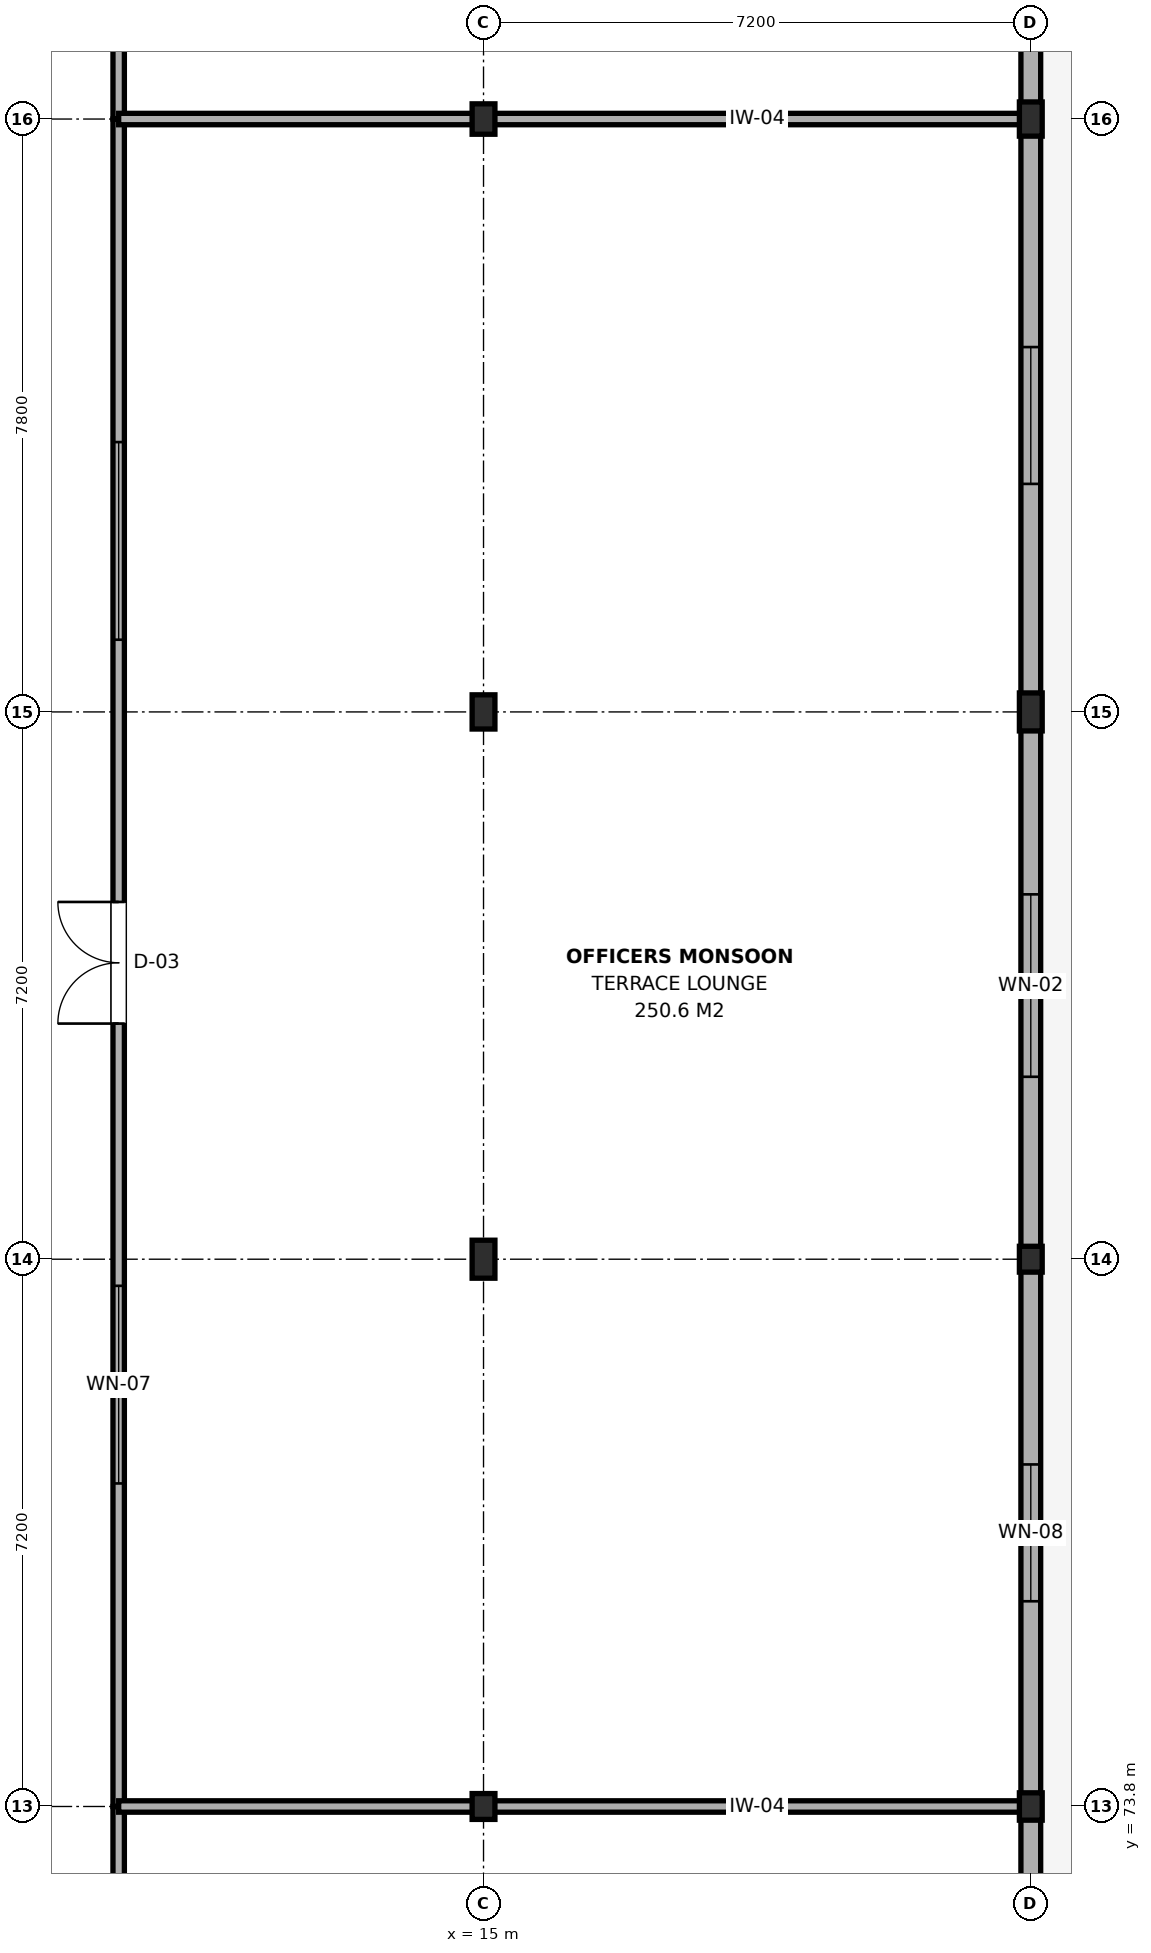
"""IFC4 building model, lengths in metres.
Left out: names, types, materials, properties, quantities, classifications, styles, units other than length and angle.
Written with IfcOpenShell. Run it as: python <this file> out.ifc"""

import sys

from ifc_helpers import new_model, si_unit, direction, frame, frame_2d, origin, origin_2d, place, context, subcontext, project, spatial, rectangle, i_section, extrude, element, fill, save


model = new_model("IFC4")
c1 = context("Model", 3, precision=1e-05, world=origin(), true_north=direction((0.0, 1.0)))
c2 = subcontext(c1, "Body", "Model", "MODEL_VIEW")
j1 = project(units=[si_unit("LENGTHUNIT", "METRE"), si_unit("PLANEANGLEUNIT", "RADIAN")], contexts=[c1])
p1 = place(None, origin())
s1 = spatial("IfcSite", under=j1, at=p1, CompositionType="ELEMENT")
p2 = place(p1, origin())
s2 = spatial("IfcBuilding", under=s1, at=p2, CompositionType="ELEMENT")
p3 = place(p2, frame((0.0, 0.0, 17.1)))
s3 = spatial("IfcBuildingStorey", under=s2, at=p3, CompositionType="ELEMENT", Elevation=17.1)
p4 = place(p3, frame((15.0, 73.8, 0.0), z_axis=(0.0, 0.0, 1.0), x_axis=(1.0, 0.0, 0.0)))
e1 = element("IfcColumn", 1, at=p4, inside=s3, PredefinedType="COLUMN", context=c2, shape_type="SweptSolid", body=[
    extrude(i_section(OverallWidth=0.3, OverallDepth=0.34, WebThickness=0.012, FlangeThickness=0.021, FilletRadius=0.027, at=origin_2d()), origin(), (0.0, 0.0, 1.0), 3.9),
])
p5 = place(p3, frame((15.0, 81.0, 0.0), z_axis=(0.0, 0.0, 1.0), x_axis=(1.0, 0.0, 0.0)))
e2 = element("IfcColumn", 2, at=p5, inside=s3, PredefinedType="COLUMN", context=c2, shape_type="SweptSolid", body=[
    extrude(i_section(OverallWidth=0.3, OverallDepth=0.5, WebThickness=0.014, FlangeThickness=0.028, FilletRadius=0.027, at=origin_2d()), origin(), (0.0, 0.0, 1.0), 3.9),
])
p6 = place(p3, frame((15.0, 88.2, 0.0), z_axis=(0.0, 0.0, 1.0), x_axis=(1.0, 0.0, 0.0)))
e3 = element("IfcColumn", 3, at=p6, inside=s3, PredefinedType="COLUMN", context=c2, shape_type="SweptSolid", body=[
    extrude(i_section(OverallWidth=0.3, OverallDepth=0.45, WebThickness=0.014, FlangeThickness=0.026, FilletRadius=0.027, at=origin_2d()), origin(), (0.0, 0.0, 1.0), 3.9),
])
p7 = place(p3, frame((15.0, 96.0, 0.0), z_axis=(0.0, 0.0, 1.0), x_axis=(1.0, 0.0, 0.0)))
e4 = element("IfcColumn", 4, at=p7, inside=s3, PredefinedType="COLUMN", context=c2, shape_type="SweptSolid", body=[
    extrude(i_section(OverallWidth=0.3, OverallDepth=0.4, WebThickness=0.013, FlangeThickness=0.024, FilletRadius=0.027, at=origin_2d()), origin(), (0.0, 0.0, 1.0), 3.9),
])
p8 = place(p3, frame((22.2, 73.8, 0.0), z_axis=(0.0, 0.0, 1.0), x_axis=(1.0, 0.0, 0.0)))
e5 = element("IfcColumn", 5, at=p8, inside=s3, PredefinedType="COLUMN", context=c2, shape_type="SweptSolid", body=[
    extrude(i_section(OverallWidth=0.3, OverallDepth=0.36, WebThickness=0.012, FlangeThickness=0.022, FilletRadius=0.027, at=origin_2d()), origin(), (0.0, 0.0, 1.0), 3.9),
])
p9 = place(p3, frame((22.2, 81.0, 0.0), z_axis=(0.0, 0.0, 1.0), x_axis=(1.0, 0.0, 0.0)))
e6 = element("IfcColumn", 6, at=p9, inside=s3, PredefinedType="COLUMN", context=c2, shape_type="SweptSolid", body=[
    extrude(i_section(OverallWidth=0.3, OverallDepth=0.34, WebThickness=0.012, FlangeThickness=0.021, FilletRadius=0.027, at=origin_2d()), origin(), (0.0, 0.0, 1.0), 3.9),
])
p10 = place(p3, frame((22.2, 88.2, 0.0), z_axis=(0.0, 0.0, 1.0), x_axis=(1.0, 0.0, 0.0)))
e7 = element("IfcColumn", 7, at=p10, inside=s3, PredefinedType="COLUMN", context=c2, shape_type="SweptSolid", body=[
    extrude(i_section(OverallWidth=0.3, OverallDepth=0.5, WebThickness=0.014, FlangeThickness=0.028, FilletRadius=0.027, at=origin_2d()), origin(), (0.0, 0.0, 1.0), 3.9),
])
p11 = place(p3, frame((22.2, 96.0, 0.0), z_axis=(0.0, 0.0, 1.0), x_axis=(1.0, 0.0, 0.0)))
e8 = element("IfcColumn", 8, at=p11, inside=s3, PredefinedType="COLUMN", context=c2, shape_type="SweptSolid", body=[
    extrude(i_section(OverallWidth=0.3, OverallDepth=0.45, WebThickness=0.014, FlangeThickness=0.026, FilletRadius=0.027, at=origin_2d()), origin(), (0.0, 0.0, 1.0), 3.9),
])
p12 = place(p3, frame((22.2, 66.6, 0.0), z_axis=(0.0, 0.0, 1.0), x_axis=(0.0, 1.0, 0.0)))
e9 = element("IfcWall", 9, at=p12, inside=s3, PredefinedType="SOLIDWALL", context=c2, shape_type="SweptSolid", body=[
    extrude(rectangle(XDim=7.2, YDim=0.26, at=frame_2d((3.6, 0.0))), origin(), (0.0, 0.0, 1.0), 3.095),
])
p13 = place(p12, frame((2.7, 0.0, 0.65)))
e10 = element("IfcOpeningElement", 10, at=p13, cuts=e9, PredefinedType="OPENING", context=c2, shape_type="SweptSolid", body=[
    extrude(rectangle(XDim=1.8, YDim=1.2, at=frame_2d((0.9, 0.6))), frame((0.0, 0.145, 0.0), z_axis=(0.0, -1.0, 0.0), x_axis=(1.0, 0.0, 0.0)), (0.0, 0.0, 1.0), 0.29),
])
p14 = place(p3, frame((22.2, 73.8, 0.0), z_axis=(0.0, 0.0, 1.0), x_axis=(0.0, 1.0, 0.0)))
e11 = element("IfcWall", 11, at=p14, inside=s3, PredefinedType="SOLIDWALL", context=c2, shape_type="SweptSolid", body=[
    extrude(rectangle(XDim=7.2, YDim=0.26, at=frame_2d((3.6, 0.0))), origin(), (0.0, 0.0, 1.0), 3.145),
])
p15 = place(p14, frame((2.7, 0.0, 0.65)))
e12 = element("IfcOpeningElement", 12, at=p15, cuts=e11, PredefinedType="OPENING", context=c2, shape_type="SweptSolid", body=[
    extrude(rectangle(XDim=1.8, YDim=1.2, at=frame_2d((0.9, 0.6))), frame((0.0, 0.145, 0.0), z_axis=(0.0, -1.0, 0.0), x_axis=(1.0, 0.0, 0.0)), (0.0, 0.0, 1.0), 0.29),
])
p16 = place(p3, frame((22.2, 81.0, 0.0), z_axis=(0.0, 0.0, 1.0), x_axis=(0.0, 1.0, 0.0)))
e13 = element("IfcWall", 13, at=p16, inside=s3, PredefinedType="SOLIDWALL", context=c2, shape_type="SweptSolid", body=[
    extrude(rectangle(XDim=7.2, YDim=0.26, at=frame_2d((3.6, 0.0))), origin(), (0.0, 0.0, 1.0), 3.195),
])
p17 = place(p16, frame((2.4, 0.0, 0.9)))
e14 = element("IfcOpeningElement", 14, at=p17, cuts=e13, PredefinedType="OPENING", context=c2, shape_type="SweptSolid", body=[
    extrude(rectangle(XDim=2.4, YDim=2.1, at=frame_2d((1.2, 1.05))), frame((0.0, 0.145, 0.0), z_axis=(0.0, -1.0, 0.0), x_axis=(1.0, 0.0, 0.0)), (0.0, 0.0, 1.0), 0.29),
])
p18 = place(p3, frame((22.2, 88.2, 0.0), z_axis=(0.0, 0.0, 1.0), x_axis=(0.0, 1.0, 0.0)))
e15 = element("IfcWall", 15, at=p18, inside=s3, PredefinedType="SOLIDWALL", context=c2, shape_type="SweptSolid", body=[
    extrude(rectangle(XDim=7.8, YDim=0.26, at=frame_2d((3.9, 0.0))), origin(), (0.0, 0.0, 1.0), 3.155),
])
p19 = place(p18, frame((3.0, 0.0, 0.65)))
e16 = element("IfcOpeningElement", 16, at=p19, cuts=e15, PredefinedType="OPENING", context=c2, shape_type="SweptSolid", body=[
    extrude(rectangle(XDim=1.8, YDim=1.2, at=frame_2d((0.9, 0.6))), frame((0.0, 0.145, 0.0), z_axis=(0.0, -1.0, 0.0), x_axis=(1.0, 0.0, 0.0)), (0.0, 0.0, 1.0), 0.29),
])
p20 = place(p3, frame((22.2, 96.0, 0.0), z_axis=(0.0, 0.0, 1.0), x_axis=(0.0, 1.0, 0.0)))
e17 = element("IfcWall", 17, at=p20, inside=s3, PredefinedType="SOLIDWALL", context=c2, shape_type="SweptSolid", body=[
    extrude(rectangle(XDim=8.4, YDim=0.26, at=frame_2d((4.2, 0.0))), origin(), (0.0, 0.0, 1.0), 3.155),
])
p21 = place(p20, frame((1.352, 0.0, 0.65)))
e18 = element("IfcOpeningElement", 18, at=p21, cuts=e17, PredefinedType="OPENING", context=c2, shape_type="SweptSolid", body=[
    extrude(rectangle(XDim=2.0, YDim=1.8, at=frame_2d((1.0, 0.9))), frame((0.0, 0.145, 0.0), z_axis=(0.0, -1.0, 0.0), x_axis=(1.0, 0.0, 0.0)), (0.0, 0.0, 1.0), 0.29),
])
p22 = place(p20, frame((5.048, 0.0, 0.65)))
e19 = element("IfcOpeningElement", 19, at=p22, cuts=e17, PredefinedType="OPENING", context=c2, shape_type="SweptSolid", body=[
    extrude(rectangle(XDim=2.0, YDim=1.8, at=frame_2d((1.0, 0.9))), frame((0.0, 0.145, 0.0), z_axis=(0.0, -1.0, 0.0), x_axis=(1.0, 0.0, 0.0)), (0.0, 0.0, 1.0), 0.29),
])
p23 = place(p3, frame((10.2, 42.0, 0.0), z_axis=(0.0, 0.0, 1.0), x_axis=(0.0, 1.0, 0.0)))
e20 = element("IfcWall", 20, at=p23, inside=s3, PredefinedType="PARTITIONING", context=c2, shape_type="SweptSolid", body=[
    extrude(rectangle(XDim=31.8, YDim=0.15, at=frame_2d((15.9, 0.0))), origin(), (0.0, 0.0, 1.0), 3.195),
])
p24 = place(p23, frame((15.1, 0.0, 0.0)))
e21 = element("IfcOpeningElement", 21, at=p24, cuts=e20, PredefinedType="OPENING", context=c2, shape_type="SweptSolid", body=[
    extrude(rectangle(XDim=1.6, YDim=2.15, at=frame_2d((0.8, 1.075))), frame((0.0, 0.09, 0.0), z_axis=(0.0, -1.0, 0.0), x_axis=(1.0, 0.0, 0.0)), (0.0, 0.0, 1.0), 0.18),
])
p25 = place(p23, frame((6.65, 0.0, 0.95)))
e22 = element("IfcOpeningElement", 22, at=p25, cuts=e20, PredefinedType="OPENING", context=c2, shape_type="SweptSolid", body=[
    extrude(rectangle(XDim=2.6, YDim=1.5, at=frame_2d((1.3, 0.75))), frame((0.0, 0.09, 0.0), z_axis=(0.0, -1.0, 0.0), x_axis=(1.0, 0.0, 0.0)), (0.0, 0.0, 1.0), 0.18),
])
p26 = place(p23, frame((22.55, 0.0, 0.95)))
e23 = element("IfcOpeningElement", 23, at=p26, cuts=e20, PredefinedType="OPENING", context=c2, shape_type="SweptSolid", body=[
    extrude(rectangle(XDim=2.6, YDim=1.5, at=frame_2d((1.3, 0.75))), frame((0.0, 0.09, 0.0), z_axis=(0.0, -1.0, 0.0), x_axis=(1.0, 0.0, 0.0)), (0.0, 0.0, 1.0), 0.18),
])
p27 = place(p3, frame((10.2, 73.8, 0.0), z_axis=(0.0, 0.0, 1.0), x_axis=(0.0, 1.0, 0.0)))
e24 = element("IfcWall", 24, at=p27, inside=s3, PredefinedType="PARTITIONING", context=c2, shape_type="SweptSolid", body=[
    extrude(rectangle(XDim=22.2, YDim=0.15, at=frame_2d((11.1, 0.0))), origin(), (0.0, 0.0, 1.0), 3.195),
])
p28 = place(p27, frame((10.3, 0.0, 0.0)))
e25 = element("IfcOpeningElement", 25, at=p28, cuts=e24, PredefinedType="OPENING", context=c2, shape_type="SweptSolid", body=[
    extrude(rectangle(XDim=1.6, YDim=2.15, at=frame_2d((0.8, 1.075))), frame((0.0, 0.09, 0.0), z_axis=(0.0, -1.0, 0.0), x_axis=(1.0, 0.0, 0.0)), (0.0, 0.0, 1.0), 0.18),
])
p29 = place(p27, frame((4.25, 0.0, 0.95)))
e26 = element("IfcOpeningElement", 26, at=p29, cuts=e24, PredefinedType="OPENING", context=c2, shape_type="SweptSolid", body=[
    extrude(rectangle(XDim=2.6, YDim=1.5, at=frame_2d((1.3, 0.75))), frame((0.0, 0.09, 0.0), z_axis=(0.0, -1.0, 0.0), x_axis=(1.0, 0.0, 0.0)), (0.0, 0.0, 1.0), 0.18),
])
p30 = place(p27, frame((15.35, 0.0, 0.95)))
e27 = element("IfcOpeningElement", 27, at=p30, cuts=e24, PredefinedType="OPENING", context=c2, shape_type="SweptSolid", body=[
    extrude(rectangle(XDim=2.6, YDim=1.5, at=frame_2d((1.3, 0.75))), frame((0.0, 0.09, 0.0), z_axis=(0.0, -1.0, 0.0), x_axis=(1.0, 0.0, 0.0)), (0.0, 0.0, 1.0), 0.18),
])
p31 = place(p3, frame((10.2, 73.8, 0.0), z_axis=(0.0, 0.0, 1.0), x_axis=(1.0, 0.0, 0.0)))
e28 = element("IfcWall", 28, at=p31, inside=s3, PredefinedType="PARTITIONING", context=c2, shape_type="SweptSolid", body=[
    extrude(rectangle(XDim=11.86, YDim=0.15, at=frame_2d((5.93, 0.0))), origin(), (0.0, 0.0, 1.0), 3.195),
])
p32 = place(p3, frame((10.2, 96.0, 0.0), z_axis=(0.0, 0.0, 1.0), x_axis=(0.0, 1.0, 0.0)))
e29 = element("IfcWall", 29, at=p32, inside=s3, PredefinedType="PARTITIONING", context=c2, shape_type="SweptSolid", body=[
    extrude(rectangle(XDim=17.4, YDim=0.15, at=frame_2d((8.7, 0.0))), origin(), (0.0, 0.0, 1.0), 3.195),
])
p33 = place(p32, frame((7.9, 0.0, 0.0)))
e30 = element("IfcOpeningElement", 30, at=p33, cuts=e29, PredefinedType="OPENING", context=c2, shape_type="SweptSolid", body=[
    extrude(rectangle(XDim=1.6, YDim=2.15, at=frame_2d((0.8, 1.075))), frame((0.0, 0.09, 0.0), z_axis=(0.0, -1.0, 0.0), x_axis=(1.0, 0.0, 0.0)), (0.0, 0.0, 1.0), 0.18),
])
p34 = place(p32, frame((3.05, 0.0, 0.95)))
e31 = element("IfcOpeningElement", 31, at=p34, cuts=e29, PredefinedType="OPENING", context=c2, shape_type="SweptSolid", body=[
    extrude(rectangle(XDim=2.6, YDim=1.5, at=frame_2d((1.3, 0.75))), frame((0.0, 0.09, 0.0), z_axis=(0.0, -1.0, 0.0), x_axis=(1.0, 0.0, 0.0)), (0.0, 0.0, 1.0), 0.18),
])
p35 = place(p32, frame((11.75, 0.0, 0.95)))
e32 = element("IfcOpeningElement", 32, at=p35, cuts=e29, PredefinedType="OPENING", context=c2, shape_type="SweptSolid", body=[
    extrude(rectangle(XDim=2.6, YDim=1.5, at=frame_2d((1.3, 0.75))), frame((0.0, 0.09, 0.0), z_axis=(0.0, -1.0, 0.0), x_axis=(1.0, 0.0, 0.0)), (0.0, 0.0, 1.0), 0.18),
])
p36 = place(p3, frame((10.2, 96.0, 0.0), z_axis=(0.0, 0.0, 1.0), x_axis=(1.0, 0.0, 0.0)))
e33 = element("IfcWall", 33, at=p36, inside=s3, PredefinedType="PARTITIONING", context=c2, shape_type="SweptSolid", body=[
    extrude(rectangle(XDim=11.86, YDim=0.15, at=frame_2d((5.93, 0.0))), origin(), (0.0, 0.0, 1.0), 3.095),
])
p37 = place(p15, origin())
e34 = element("IfcWindow", 34, at=p37, inside=s3, PartitioningType="SINGLE_PANEL", PredefinedType="WINDOW", context=c2, shape_type="SweptSolid", body=[
    extrude(rectangle(XDim=1.8, YDim=1.2, at=frame_2d((0.9, 0.6))), frame((0.0, 0.03, 0.0), z_axis=(0.0, -1.0, 0.0), x_axis=(1.0, 0.0, 0.0)), (0.0, 0.0, 1.0), 0.06),
])
fill(e12, e34)
p38 = place(p17, origin())
e35 = element("IfcWindow", 35, at=p38, inside=s3, PartitioningType="SINGLE_PANEL", PredefinedType="WINDOW", context=c2, shape_type="SweptSolid", body=[
    extrude(rectangle(XDim=2.4, YDim=2.1, at=frame_2d((1.2, 1.05))), frame((0.0, 0.03, 0.0), z_axis=(0.0, -1.0, 0.0), x_axis=(1.0, 0.0, 0.0)), (0.0, 0.0, 1.0), 0.06),
])
fill(e14, e35)
p39 = place(p19, origin())
e36 = element("IfcWindow", 36, at=p39, inside=s3, PartitioningType="SINGLE_PANEL", PredefinedType="WINDOW", context=c2, shape_type="SweptSolid", body=[
    extrude(rectangle(XDim=1.8, YDim=1.2, at=frame_2d((0.9, 0.6))), frame((0.0, 0.03, 0.0), z_axis=(0.0, -1.0, 0.0), x_axis=(1.0, 0.0, 0.0)), (0.0, 0.0, 1.0), 0.06),
])
fill(e16, e36)
p40 = place(p28, origin())
e37 = element("IfcDoor", 37, at=p40, inside=s3, OperationType="DOUBLE_DOOR_SINGLE_SWING", PredefinedType="DOOR", context=c2, shape_type="SweptSolid", body=[
    extrude(rectangle(XDim=1.6, YDim=2.15, at=frame_2d((0.8, 1.075))), frame((0.0, 0.025, 0.0), z_axis=(0.0, -1.0, 0.0), x_axis=(1.0, 0.0, 0.0)), (0.0, 0.0, 1.0), 0.05),
])
fill(e25, e37)
p41 = place(p29, origin())
e38 = element("IfcWindow", 38, at=p41, inside=s3, PartitioningType="SINGLE_PANEL", PredefinedType="WINDOW", context=c2, shape_type="SweptSolid", body=[
    extrude(rectangle(XDim=2.6, YDim=1.5, at=frame_2d((1.3, 0.75))), frame((0.0, 0.03, 0.0), z_axis=(0.0, -1.0, 0.0), x_axis=(1.0, 0.0, 0.0)), (0.0, 0.0, 1.0), 0.06),
])
fill(e26, e38)
p42 = place(p30, origin())
e39 = element("IfcWindow", 39, at=p42, inside=s3, PartitioningType="SINGLE_PANEL", PredefinedType="WINDOW", context=c2, shape_type="SweptSolid", body=[
    extrude(rectangle(XDim=2.6, YDim=1.5, at=frame_2d((1.3, 0.75))), frame((0.0, 0.03, 0.0), z_axis=(0.0, -1.0, 0.0), x_axis=(1.0, 0.0, 0.0)), (0.0, 0.0, 1.0), 0.06),
])
fill(e27, e39)
save(model, sys.argv[1])
